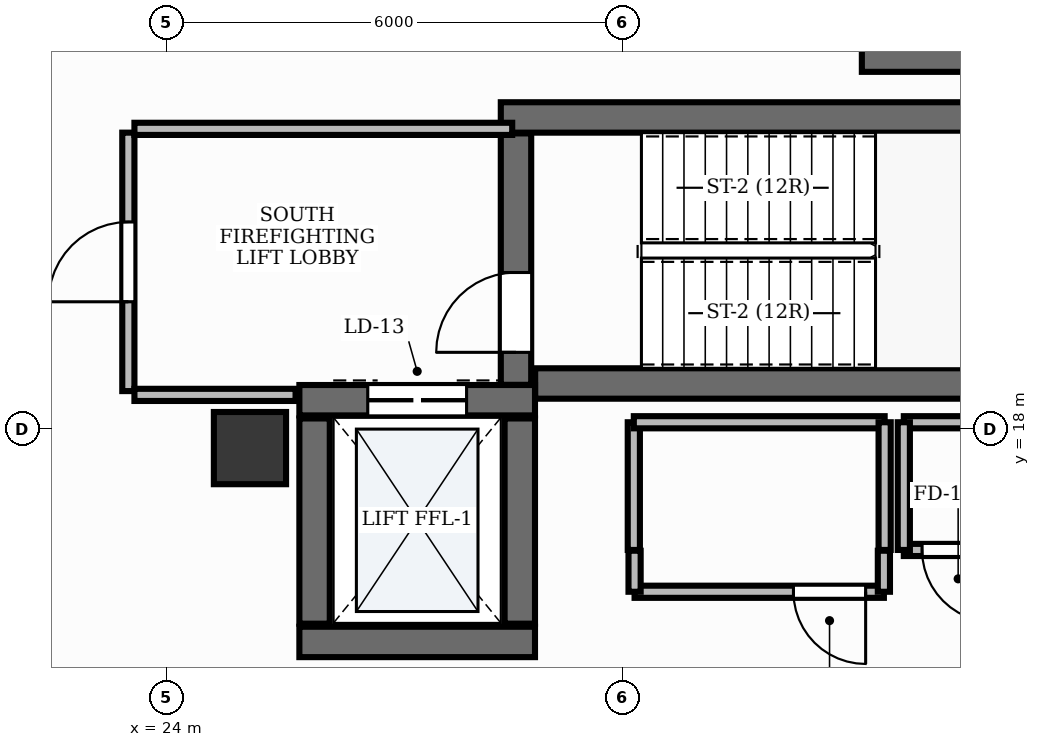
"""IFC4 building model, lengths in metres.
Left out: names, types, materials, properties, quantities, classifications, styles, units other than length and angle.
Written with IfcOpenShell. Run it as: python <this file> out.ifc"""

import sys

from ifc_helpers import new_model, si_unit, direction, frame, frame_2d, origin, origin_2d, place, context, subcontext, project, spatial, rectangle, extrude, element, fill, save


model = new_model("IFC4")
c1 = context("Model", 3, precision=1e-05, world=origin(), true_north=direction((0.0, 1.0)))
c2 = subcontext(c1, "Body", "Model", "MODEL_VIEW")
j1 = project(units=[si_unit("LENGTHUNIT", "METRE"), si_unit("PLANEANGLEUNIT", "RADIAN")], contexts=[c1])
p1 = place(None, origin())
s1 = spatial("IfcSite", under=j1, at=p1, CompositionType="ELEMENT")
p2 = place(p1, origin())
s2 = spatial("IfcBuilding", under=s1, at=p2, CompositionType="ELEMENT")
p3 = place(p2, frame((0.0, 0.0, 208.8)))
s3 = spatial("IfcBuildingStorey", under=s2, at=p3, CompositionType="ELEMENT", Elevation=208.8)
p4 = place(p3, frame((28.852, 18.6, 0.0), z_axis=(0.0, 0.0, 1.0), x_axis=(1.0, 0.0, 0.0)))
e1 = element("IfcWall", 1, at=p4, inside=s3, PredefinedType="SHEAR", context=c2, shape_type="SweptSolid", body=[
    extrude(rectangle(XDim=8.198, YDim=0.4, at=frame_2d((4.099, 0.0))), origin(), (0.0, 0.0, 1.0), 3.88),
])
p5 = place(p3, frame((28.4, 22.1, 0.0), z_axis=(0.0, 0.0, 1.0), x_axis=(1.0, 0.0, 0.0)))
e2 = element("IfcWall", 2, at=p5, inside=s3, PredefinedType="SHEAR", context=c2, shape_type="SweptSolid", body=[
    extrude(rectangle(XDim=8.65, YDim=0.4, at=frame_2d((4.325, 0.0))), origin(), (0.0, 0.0, 1.0), 3.88),
])
p6 = place(p3, frame((28.6, 18.582, 0.0), z_axis=(0.0, 0.0, 1.0), x_axis=(0.0, 1.0, 0.0)))
e3 = element("IfcWall", 3, at=p6, inside=s3, PredefinedType="SHEAR", context=c2, shape_type="SweptSolid", body=[
    extrude(rectangle(XDim=3.308, YDim=0.4, at=frame_2d((1.654, 0.0))), origin(), (0.0, 0.0, 1.0), 3.88),
])
p7 = place(p6, frame((0.428, 0.0, 0.0)))
e4 = element("IfcOpeningElement", 4, at=p7, cuts=e3, PredefinedType="OPENING", context=c2, shape_type="SweptSolid", body=[
    extrude(rectangle(XDim=1.05, YDim=2.15, at=frame_2d((0.525, 1.075))), frame((0.0, 0.215, 0.0), z_axis=(0.0, -1.0, 0.0), x_axis=(1.0, 0.0, 0.0)), (0.0, 0.0, 1.0), 0.43),
])
p8 = place(p3, frame((33.15, 22.9, 0.0), z_axis=(0.0, 0.0, 1.0), x_axis=(1.0, 0.0, 0.0)))
e5 = element("IfcWall", 5, at=p8, inside=s3, PredefinedType="SHEAR", context=c2, shape_type="SweptSolid", body=[
    extrude(rectangle(XDim=3.9, YDim=0.4, at=frame_2d((1.95, 0.0))), origin(), (0.0, 0.0, 1.0), 3.88),
])
p9 = place(p3, frame((25.75, 15.2, 0.0), z_axis=(0.0, 0.0, 1.0), x_axis=(1.0, 0.0, 0.0)))
e6 = element("IfcWall", 6, at=p9, inside=s3, PredefinedType="SHEAR", context=c2, shape_type="SweptSolid", body=[
    extrude(rectangle(XDim=3.1, YDim=0.4, at=frame_2d((1.55, 0.0))), origin(), (0.0, 0.0, 1.0), 3.88),
])
p10 = place(p3, frame((25.75, 18.38, 0.0), z_axis=(0.0, 0.0, 1.0), x_axis=(1.0, 0.0, 0.0)))
e7 = element("IfcWall", 7, at=p10, inside=s3, PredefinedType="SHEAR", context=c2, shape_type="SweptSolid", body=[
    extrude(rectangle(XDim=3.1, YDim=0.4, at=frame_2d((1.55, 0.0))), origin(), (0.0, 0.0, 1.0), 3.88),
])
p11 = place(p10, frame((0.9, 0.0, 0.0)))
e8 = element("IfcOpeningElement", 8, at=p11, cuts=e7, PredefinedType="OPENING", context=c2, shape_type="SweptSolid", body=[
    extrude(rectangle(XDim=1.3, YDim=2.2, at=frame_2d((0.65, 1.1))), frame((0.0, 0.215, 0.0), z_axis=(0.0, -1.0, 0.0), x_axis=(1.0, 0.0, 0.0)), (0.0, 0.0, 1.0), 0.43),
])
for number, where, z_axis, x_axis in (
    (9, (25.95, 15.44, 0.0), (0.0, 0.0, 1.0), (0.0, 1.0, 0.0)),
    (10, (28.65, 15.44, 0.0), (0.0, 0.0, 1.0), (0.0, 1.0, 0.0)),
):
    element("IfcWall", number, at=place(p3, frame(where, z_axis=z_axis, x_axis=x_axis)), inside=s3, PredefinedType="SHEAR", context=c2, shape_type="SweptSolid", body=[
        extrude(rectangle(XDim=2.7, YDim=0.4, at=frame_2d((1.35, 0.0))), origin(), (0.0, 0.0, 1.0), 3.88),
    ])
p12 = place(p3, frame((25.1, 17.75, -0.0), z_axis=(0.0, 0.0, 1.0), x_axis=(1.0, 0.0, 0.0)))
e11 = element("IfcColumn", 11, at=p12, inside=s3, PredefinedType="PILASTER", context=c2, shape_type="SweptSolid", body=[
    extrude(rectangle(XDim=0.95, YDim=0.95, at=origin_2d()), origin(), (0.0, 0.0, 1.0), 3.881),
])
p13 = place(p3, frame((23.5, 18.5, 0.0), z_axis=(0.0, 0.0, 1.0), x_axis=(0.0, 1.0, 0.0)))
e12 = element("IfcWall", 12, at=p13, inside=s3, PredefinedType="PARTITIONING", context=c2, shape_type="SweptSolid", body=[
    extrude(rectangle(XDim=3.4, YDim=0.16, at=frame_2d((1.7, 0.0))), origin(), (0.0, 0.0, 1.0), 2.22),
])
p14 = place(p13, frame((1.175, 0.0, 0.0)))
e13 = element("IfcOpeningElement", 13, at=p14, cuts=e12, PredefinedType="OPENING", context=c2, shape_type="SweptSolid", body=[
    extrude(rectangle(XDim=1.05, YDim=2.15, at=frame_2d((0.525, 1.075))), frame((0.0, 0.095, 0.0), z_axis=(0.0, -1.0, 0.0), x_axis=(1.0, 0.0, 0.0)), (0.0, 0.0, 1.0), 0.19),
])
p15 = place(p3, frame((23.58, 21.95, 0.0), z_axis=(0.0, 0.0, 1.0), x_axis=(1.0, 0.0, 0.0)))
e14 = element("IfcWall", 14, at=p15, inside=s3, PredefinedType="PARTITIONING", context=c2, shape_type="SweptSolid", body=[
    extrude(rectangle(XDim=4.97, YDim=0.16, at=frame_2d((2.485, 0.0))), origin(), (0.0, 0.0, 1.0), 2.22),
])
p16 = place(p3, frame((23.58, 18.45, 0.0), z_axis=(0.0, 0.0, 1.0), x_axis=(1.0, 0.0, 0.0)))
e15 = element("IfcWall", 15, at=p16, inside=s3, PredefinedType="PARTITIONING", context=c2, shape_type="SweptSolid", body=[
    extrude(rectangle(XDim=2.12, YDim=0.16, at=frame_2d((1.06, 0.0))), origin(), (0.0, 0.0, 1.0), 2.22),
])
p17 = place(p3, frame((33.44, 15.86, 0.0), z_axis=(0.0, 0.0, 1.0), x_axis=(-1.0, 0.0, 0.0)))
e16 = element("IfcWall", 16, at=p17, inside=s3, PredefinedType="PARTITIONING", context=c2, shape_type="SweptSolid", body=[
    extrude(rectangle(XDim=3.28, YDim=0.16, at=frame_2d((1.64, 0.0))), origin(), (0.0, 0.0, 1.0), 2.22),
])
p18 = place(p17, frame((0.24, 0.0, 0.0)))
e17 = element("IfcOpeningElement", 17, at=p18, cuts=e16, PredefinedType="OPENING", context=c2, shape_type="SweptSolid", body=[
    extrude(rectangle(XDim=0.95, YDim=2.15, at=frame_2d((0.475, 1.075))), frame((0.0, 0.095, 0.0), z_axis=(0.0, -1.0, 0.0), x_axis=(1.0, 0.0, 0.0)), (0.0, 0.0, 1.0), 0.19),
])
p19 = place(p3, frame((44.5, 16.41, 0.0), z_axis=(0.0, 0.0, 1.0), x_axis=(-1.0, 0.0, 0.0)))
e18 = element("IfcWall", 18, at=p19, inside=s3, PredefinedType="PARTITIONING", context=c2, shape_type="SweptSolid", body=[
    extrude(rectangle(XDim=10.798, YDim=0.16, at=frame_2d((5.399, 0.0))), origin(), (0.0, 0.0, 1.0), 2.22),
])
p20 = place(p19, frame((9.608, 0.0, 0.0)))
e19 = element("IfcOpeningElement", 19, at=p20, cuts=e18, PredefinedType="OPENING", context=c2, shape_type="SweptSolid", body=[
    extrude(rectangle(XDim=0.95, YDim=2.15, at=frame_2d((0.475, 1.075))), frame((0.0, 0.095, 0.0), z_axis=(0.0, -1.0, 0.0), x_axis=(1.0, 0.0, 0.0)), (0.0, 0.0, 1.0), 0.19),
])
for number, where, z_axis, x_axis in (
    (20, (33.44, 16.4, 0.0), (0.0, 0.0, 1.0), (0.0, -1.0, 0.0)),
    (21, (30.16, 15.86, 0.0), (0.0, 0.0, 1.0), (0.0, 1.0, 0.0)),
):
    element("IfcWall", number, at=place(p3, frame(where, z_axis=z_axis, x_axis=x_axis)), inside=s3, PredefinedType="PARTITIONING", context=c2, shape_type="SweptSolid", body=[
        extrude(rectangle(XDim=0.54, YDim=0.16, at=frame_2d((0.27, 0.0))), origin(), (0.0, 0.0, 1.0), 2.22),
    ])
p21 = place(p3, frame((30.15, 16.41, 0.0), z_axis=(0.0, 0.0, 1.0), x_axis=(0.0, 1.0, 0.0)))
e22 = element("IfcWall", 22, at=p21, inside=s3, PredefinedType="PARTITIONING", context=c2, shape_type="SweptSolid", body=[
    extrude(rectangle(XDim=1.68, YDim=0.16, at=frame_2d((0.84, 0.0))), origin(), (0.0, 0.0, 1.0), 2.22),
])
p22 = place(p3, frame((30.15, 18.09, 0.0), z_axis=(0.0, 0.0, 1.0), x_axis=(1.0, 0.0, 0.0)))
e23 = element("IfcWall", 23, at=p22, inside=s3, PredefinedType="PARTITIONING", context=c2, shape_type="SweptSolid", body=[
    extrude(rectangle(XDim=3.3, YDim=0.16, at=frame_2d((1.65, 0.0))), origin(), (0.0, 0.0, 1.0), 2.22),
])
p23 = place(p3, frame((33.45, 18.09, 0.0), z_axis=(0.0, 0.0, 1.0), x_axis=(0.0, -1.0, 0.0)))
e24 = element("IfcWall", 24, at=p23, inside=s3, PredefinedType="PARTITIONING", context=c2, shape_type="SweptSolid", body=[
    extrude(rectangle(XDim=1.68, YDim=0.16, at=frame_2d((0.84, 0.0))), origin(), (0.0, 0.0, 1.0), 2.22),
])
p24 = place(p3, frame((33.702, 18.09, 0.0), z_axis=(0.0, 0.0, 1.0), x_axis=(1.0, 0.0, 0.0)))
e25 = element("IfcWall", 25, at=p24, inside=s3, PredefinedType="PARTITIONING", context=c2, shape_type="SweptSolid", body=[
    extrude(rectangle(XDim=3.648, YDim=0.16, at=frame_2d((1.824, 0.0))), origin(), (0.0, 0.0, 1.0), 2.22),
])
p25 = place(p3, frame((33.702, 16.41, 0.0), z_axis=(0.0, 0.0, 1.0), x_axis=(0.0, 1.0, 0.0)))
e26 = element("IfcWall", 26, at=p25, inside=s3, PredefinedType="PARTITIONING", context=c2, shape_type="SweptSolid", body=[
    extrude(rectangle(XDim=1.68, YDim=0.16, at=frame_2d((0.84, 0.0))), origin(), (0.0, 0.0, 1.0), 2.22),
])
p26 = place(p7, origin())
e27 = element("IfcDoor", 27, at=p26, inside=s3, OperationType="SINGLE_SWING_LEFT", PredefinedType="DOOR", context=c2, shape_type="SweptSolid", body=[
    extrude(rectangle(XDim=1.05, YDim=2.15, at=frame_2d((0.525, 1.075))), frame((0.0, 0.025, 0.0), z_axis=(0.0, -1.0, 0.0), x_axis=(1.0, 0.0, 0.0)), (0.0, 0.0, 1.0), 0.05),
])
fill(e4, e27)
p27 = place(p11, origin())
e28 = element("IfcDoor", 28, at=p27, inside=s3, OperationType="DOUBLE_DOOR_SLIDING", PredefinedType="DOOR", context=c2, shape_type="SweptSolid", body=[
    extrude(rectangle(XDim=1.3, YDim=2.2, at=frame_2d((0.65, 1.1))), frame((0.0, 0.025, 0.0), z_axis=(0.0, -1.0, 0.0), x_axis=(1.0, 0.0, 0.0)), (0.0, 0.0, 1.0), 0.05),
])
fill(e8, e28)
p28 = place(p14, origin())
e29 = element("IfcDoor", 29, at=p28, inside=s3, OperationType="SINGLE_SWING_LEFT", PredefinedType="DOOR", context=c2, shape_type="SweptSolid", body=[
    extrude(rectangle(XDim=1.05, YDim=2.15, at=frame_2d((0.525, 1.075))), frame((0.0, 0.025, 0.0), z_axis=(0.0, -1.0, 0.0), x_axis=(1.0, 0.0, 0.0)), (0.0, 0.0, 1.0), 0.05),
])
fill(e13, e29)
p29 = place(p18, origin())
e30 = element("IfcDoor", 30, at=p29, inside=s3, OperationType="SINGLE_SWING_LEFT", PredefinedType="DOOR", context=c2, shape_type="SweptSolid", body=[
    extrude(rectangle(XDim=0.95, YDim=2.15, at=frame_2d((0.475, 1.075))), frame((0.0, 0.025, 0.0), z_axis=(0.0, -1.0, 0.0), x_axis=(1.0, 0.0, 0.0)), (0.0, 0.0, 1.0), 0.05),
])
fill(e17, e30)
p30 = place(p20, origin())
e31 = element("IfcDoor", 31, at=p30, inside=s3, OperationType="SINGLE_SWING_LEFT", PredefinedType="DOOR", context=c2, shape_type="SweptSolid", body=[
    extrude(rectangle(XDim=0.95, YDim=2.15, at=frame_2d((0.475, 1.075))), frame((0.0, 0.025, 0.0), z_axis=(0.0, -1.0, 0.0), x_axis=(1.0, 0.0, 0.0)), (0.0, 0.0, 1.0), 0.05),
])
fill(e19, e31)
save(model, sys.argv[1])
